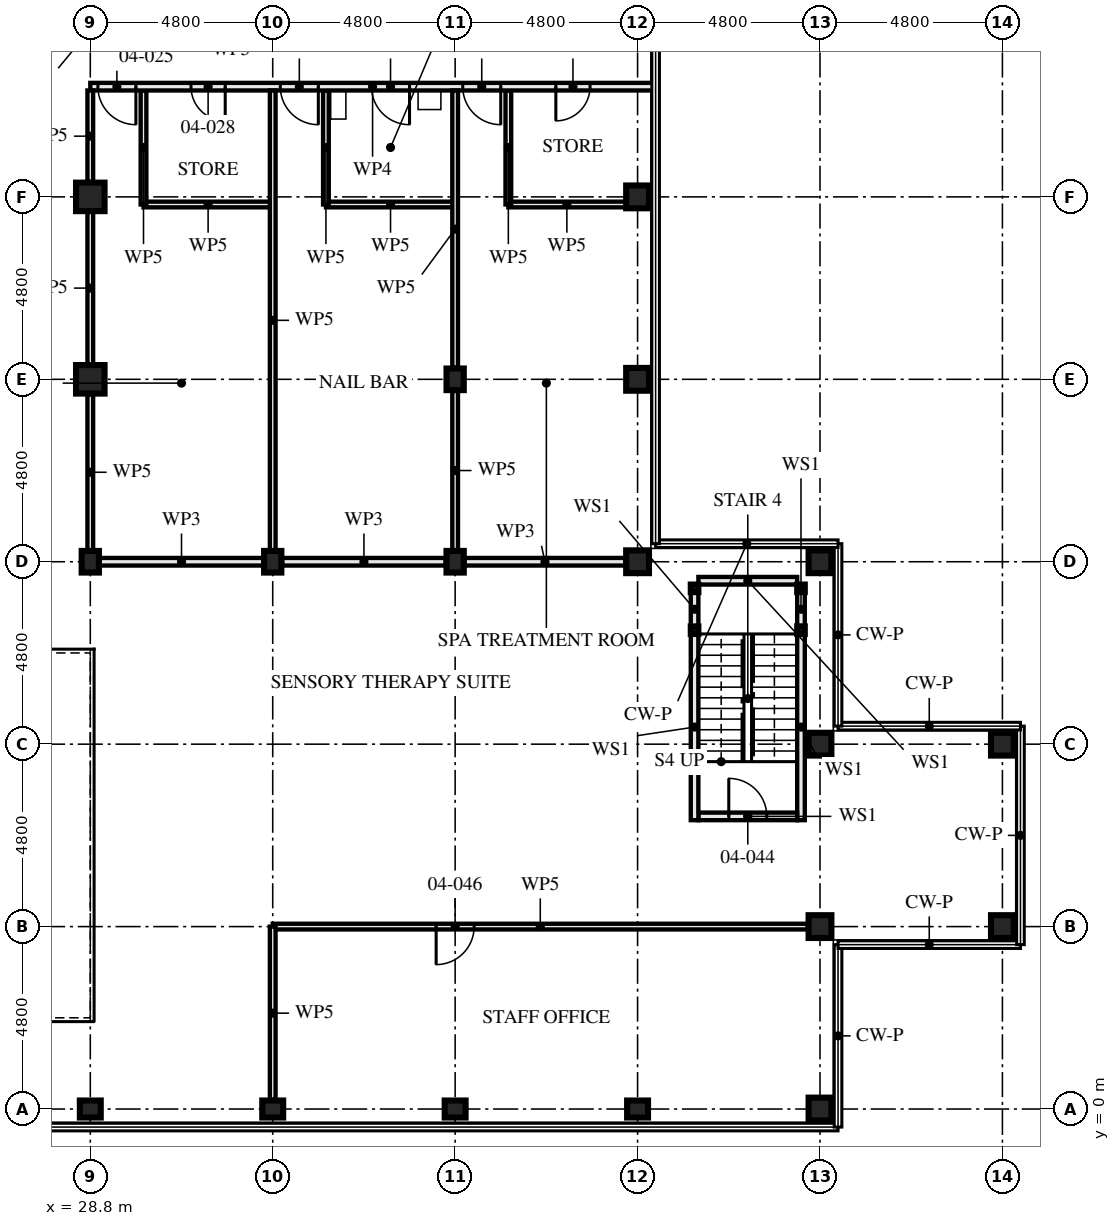
"""IFC4 building model, lengths in metres.
Left out: names, types, materials, properties, quantities, classifications, styles, units other than length and angle.
Written with IfcOpenShell. Run it as: python <this file> out.ifc"""

import sys

from ifc_helpers import new_model, si_unit, direction, frame, frame_2d, origin, origin_2d, place, context, subcontext, project, spatial, rectangle, hollow_rectangle, i_section, extrude, element, fill, save


model = new_model("IFC4")
c1 = context("Model", 3, precision=1e-05, world=origin(), true_north=direction((0.0, 1.0)))
c2 = subcontext(c1, "Body", "Model", "MODEL_VIEW")
j1 = project(units=[si_unit("LENGTHUNIT", "METRE"), si_unit("PLANEANGLEUNIT", "RADIAN")], contexts=[c1])
p1 = place(None, origin())
s1 = spatial("IfcSite", under=j1, at=p1, CompositionType="ELEMENT")
p2 = place(p1, origin())
s2 = spatial("IfcBuilding", under=s1, at=p2, CompositionType="ELEMENT")
p3 = place(p2, frame((0.0, 0.0, 18.0)))
s3 = spatial("IfcBuildingStorey", under=s2, at=p3, CompositionType="ELEMENT", Elevation=18.0)
p4 = place(p3, frame((28.8, 0.0, 0.0), z_axis=(0.0, 0.0, 1.0), x_axis=(0.0, 1.0, 0.0)))
e1 = element("IfcColumn", 1, at=p4, inside=s3, PredefinedType="COLUMN", context=c2, shape_type="SweptSolid", body=[
    extrude(i_section(OverallWidth=0.448, OverallDepth=0.55, WebThickness=0.072, FlangeThickness=0.115, FilletRadius=0.015, at=origin_2d()), origin(), (0.0, 0.0, 1.0), 4.5),
])
p5 = place(p3, frame((28.8, 14.4, 0.0), z_axis=(0.0, 0.0, 1.0), x_axis=(1.0, 0.0, 0.0)))
e2 = element("IfcColumn", 2, at=p5, inside=s3, PredefinedType="COLUMN", context=c2, shape_type="SweptSolid", body=[
    extrude(i_section(OverallWidth=0.454, OverallDepth=0.569, WebThickness=0.078, FlangeThickness=0.125, FilletRadius=0.015, at=origin_2d()), origin(), (0.0, 0.0, 1.0), 4.5),
])
for number, where, z_axis, x_axis in (
    (3, (28.8, 19.2, 0.0), (0.0, 0.0, 1.0), (1.0, 0.0, 0.0)),
    (4, (28.8, 24.0, 0.0), (0.0, 0.0, 1.0), (1.0, 0.0, 0.0)),
):
    element("IfcColumn", number, at=place(p3, frame(where, z_axis=z_axis, x_axis=x_axis)), inside=s3, PredefinedType="COLUMN", context=c2, shape_type="SweptSolid", body=[
        extrude(hollow_rectangle(XDim=0.75, YDim=0.75, WallThickness=0.08, at=origin_2d()), origin(), (0.0, 0.0, 1.0), 4.5),
    ])
p6 = place(p3, frame((33.6, 0.0, 0.0), z_axis=(0.0, 0.0, 1.0), x_axis=(0.0, 1.0, 0.0)))
e5 = element("IfcColumn", 5, at=p6, inside=s3, PredefinedType="COLUMN", context=c2, shape_type="SweptSolid", body=[
    extrude(i_section(OverallWidth=0.448, OverallDepth=0.55, WebThickness=0.072, FlangeThickness=0.115, FilletRadius=0.015, at=origin_2d()), origin(), (0.0, 0.0, 1.0), 4.5),
])
p7 = place(p3, frame((33.6, 14.4, 0.0), z_axis=(0.0, 0.0, 1.0), x_axis=(1.0, 0.0, 0.0)))
e6 = element("IfcColumn", 6, at=p7, inside=s3, PredefinedType="COLUMN", context=c2, shape_type="SweptSolid", body=[
    extrude(i_section(OverallWidth=0.454, OverallDepth=0.569, WebThickness=0.078, FlangeThickness=0.125, FilletRadius=0.015, at=origin_2d()), origin(), (0.0, 0.0, 1.0), 4.5),
])
p8 = place(p3, frame((38.4, 0.0, 0.0), z_axis=(0.0, 0.0, 1.0), x_axis=(0.0, 1.0, 0.0)))
e7 = element("IfcColumn", 7, at=p8, inside=s3, PredefinedType="COLUMN", context=c2, shape_type="SweptSolid", body=[
    extrude(i_section(OverallWidth=0.448, OverallDepth=0.55, WebThickness=0.072, FlangeThickness=0.115, FilletRadius=0.015, at=origin_2d()), origin(), (0.0, 0.0, 1.0), 4.5),
])
for number, where, z_axis, x_axis in (
    (8, (38.4, 14.4, 0.0), (0.0, 0.0, 1.0), (1.0, 0.0, 0.0)),
    (9, (38.4, 19.2, 0.0), (0.0, 0.0, 1.0), (1.0, 0.0, 0.0)),
):
    element("IfcColumn", number, at=place(p3, frame(where, z_axis=z_axis, x_axis=x_axis)), inside=s3, PredefinedType="COLUMN", context=c2, shape_type="SweptSolid", body=[
        extrude(i_section(OverallWidth=0.454, OverallDepth=0.569, WebThickness=0.078, FlangeThickness=0.125, FilletRadius=0.015, at=origin_2d()), origin(), (0.0, 0.0, 1.0), 4.5),
    ])
p9 = place(p3, frame((43.2, 0.0, 0.0), z_axis=(0.0, 0.0, 1.0), x_axis=(0.0, 1.0, 0.0)))
e10 = element("IfcColumn", 10, at=p9, inside=s3, PredefinedType="COLUMN", context=c2, shape_type="SweptSolid", body=[
    extrude(i_section(OverallWidth=0.448, OverallDepth=0.55, WebThickness=0.072, FlangeThickness=0.115, FilletRadius=0.015, at=origin_2d()), origin(), (0.0, 0.0, 1.0), 4.5),
])
p10 = place(p3, frame((43.2, 14.4, 0.0), z_axis=(0.0, 0.0, 1.0), x_axis=(0.0, 1.0, 0.0)))
e11 = element("IfcColumn", 11, at=p10, inside=s3, PredefinedType="COLUMN", context=c2, shape_type="SweptSolid", body=[
    extrude(hollow_rectangle(XDim=0.6, YDim=0.6, WallThickness=0.05, at=origin_2d()), origin(), (0.0, 0.0, 1.0), 4.5),
])
for number, where, z_axis, x_axis in (
    (12, (43.2, 19.2, 0.0), (0.0, 0.0, 1.0), (1.0, 0.0, 0.0)),
    (13, (43.2, 24.0, 0.0), (0.0, 0.0, 1.0), (1.0, 0.0, 0.0)),
):
    element("IfcColumn", number, at=place(p3, frame(where, z_axis=z_axis, x_axis=x_axis)), inside=s3, PredefinedType="COLUMN", context=c2, shape_type="SweptSolid", body=[
        extrude(hollow_rectangle(XDim=0.6, YDim=0.6, WallThickness=0.08, at=origin_2d()), origin(), (0.0, 0.0, 1.0), 4.5),
    ])
for number, where, z_axis, x_axis in (
    (14, (48.0, 0.0, 0.0), (0.0, 0.0, 1.0), (0.0, 1.0, 0.0)),
    (15, (48.0, 4.8, 0.0), (0.0, 0.0, 1.0), (0.0, 1.0, 0.0)),
    (16, (48.0, 9.6, 0.0), (0.0, 0.0, 1.0), (0.0, 1.0, 0.0)),
    (17, (48.0, 14.4, 0.0), (0.0, 0.0, 1.0), (0.0, 1.0, 0.0)),
    (18, (52.8, 4.8, 0.0), (0.0, 0.0, 1.0), (0.0, 1.0, 0.0)),
    (19, (52.8, 9.6, 0.0), (0.0, 0.0, 1.0), (0.0, 1.0, 0.0)),
):
    element("IfcColumn", number, at=place(p3, frame(where, z_axis=z_axis, x_axis=x_axis)), inside=s3, PredefinedType="COLUMN", context=c2, shape_type="SweptSolid", body=[
        extrude(hollow_rectangle(XDim=0.6, YDim=0.6, WallThickness=0.05, at=origin_2d()), origin(), (0.0, 0.0, 1.0), 4.5),
    ])
for number, where, z_axis, x_axis in (
    (20, (44.7, 13.7, 0.0), (0.0, 0.0, 1.0), (1.0, 0.0, 0.0)),
    (21, (47.5, 13.7, 0.0), (0.0, 0.0, 1.0), (1.0, 0.0, 0.0)),
    (22, (44.7, 12.6, 0.0), (0.0, 0.0, 1.0), (1.0, 0.0, 0.0)),
    (23, (47.5, 12.6, 0.0), (0.0, 0.0, 1.0), (1.0, 0.0, 0.0)),
):
    element("IfcColumn", number, at=place(p3, frame(where, z_axis=z_axis, x_axis=x_axis)), inside=s3, PredefinedType="COLUMN", context=c2, shape_type="SweptSolid", body=[
        extrude(hollow_rectangle(XDim=0.2, YDim=0.2, WallThickness=0.008, at=origin_2d()), origin(), (0.0, 0.0, 1.0), 4.33),
    ])
p11 = place(p3, frame((30.2, 23.8, 0.0), z_axis=(0.0, 0.0, 1.0), x_axis=(0.0, 1.0, 0.0)))
e24 = element("IfcWall", 24, at=p11, inside=s3, PredefinedType="PARTITIONING", context=c2, shape_type="SweptSolid", body=[
    extrude(rectangle(XDim=3.0, YDim=0.15, at=frame_2d((1.5, 0.0))), origin(), (0.0, 0.0, 1.0), 3.55),
])
p12 = place(p3, frame((30.2, 23.8, 0.0), z_axis=(0.0, 0.0, 1.0), x_axis=(1.0, 0.0, 0.0)))
e25 = element("IfcWall", 25, at=p12, inside=s3, PredefinedType="PARTITIONING", context=c2, shape_type="SweptSolid", body=[
    extrude(rectangle(XDim=3.4, YDim=0.15, at=frame_2d((1.7, 0.0))), origin(), (0.0, 0.0, 1.0), 4.33),
])
p13 = place(p3, frame((35.0, 23.8, 0.0), z_axis=(0.0, 0.0, 1.0), x_axis=(0.0, 1.0, 0.0)))
e26 = element("IfcWall", 26, at=p13, inside=s3, PredefinedType="PARTITIONING", context=c2, shape_type="SweptSolid", body=[
    extrude(rectangle(XDim=3.0, YDim=0.15, at=frame_2d((1.5, 0.0))), origin(), (0.0, 0.0, 1.0), 3.55),
])
p14 = place(p3, frame((35.0, 23.8, 0.0), z_axis=(0.0, 0.0, 1.0), x_axis=(1.0, 0.0, 0.0)))
e27 = element("IfcWall", 27, at=p14, inside=s3, PredefinedType="PARTITIONING", context=c2, shape_type="SweptSolid", body=[
    extrude(rectangle(XDim=3.4, YDim=0.15, at=frame_2d((1.7, 0.0))), origin(), (0.0, 0.0, 1.0), 4.33),
])
p15 = place(p3, frame((39.8, 23.8, 0.0), z_axis=(0.0, 0.0, 1.0), x_axis=(0.0, 1.0, 0.0)))
e28 = element("IfcWall", 28, at=p15, inside=s3, PredefinedType="PARTITIONING", context=c2, shape_type="SweptSolid", body=[
    extrude(rectangle(XDim=3.0, YDim=0.15, at=frame_2d((1.5, 0.0))), origin(), (0.0, 0.0, 1.0), 3.55),
])
p16 = place(p3, frame((39.8, 23.8, 0.0), z_axis=(0.0, 0.0, 1.0), x_axis=(1.0, 0.0, 0.0)))
e29 = element("IfcWall", 29, at=p16, inside=s3, PredefinedType="PARTITIONING", context=c2, shape_type="SweptSolid", body=[
    extrude(rectangle(XDim=3.08, YDim=0.15, at=frame_2d((1.54, 0.0))), origin(), (0.0, 0.0, 1.0), 4.33),
])
p17 = place(p3, frame((33.6, 14.705, 0.0), z_axis=(0.0, 0.0, 1.0), x_axis=(0.0, 1.0, 0.0)))
e30 = element("IfcWall", 30, at=p17, inside=s3, PredefinedType="PARTITIONING", context=c2, shape_type="SweptSolid", body=[
    extrude(rectangle(XDim=12.095, YDim=0.15, at=frame_2d((6.048, 0.0))), origin(), (0.0, 0.0, 1.0), 3.55),
])
p18 = place(p3, frame((38.4, 14.705, 0.0), z_axis=(0.0, 0.0, 1.0), x_axis=(0.0, 1.0, 0.0)))
e31 = element("IfcWall", 31, at=p18, inside=s3, PredefinedType="PARTITIONING", context=c2, shape_type="SweptSolid", body=[
    extrude(rectangle(XDim=4.191, YDim=0.15, at=frame_2d((2.095, 0.0))), origin(), (0.0, 0.0, 1.0), 3.32),
])
p19 = place(p3, frame((38.4, 19.504, 0.0), z_axis=(0.0, 0.0, 1.0), x_axis=(0.0, 1.0, 0.0)))
e32 = element("IfcWall", 32, at=p19, inside=s3, PredefinedType="PARTITIONING", context=c2, shape_type="SweptSolid", body=[
    extrude(rectangle(XDim=7.296, YDim=0.15, at=frame_2d((3.648, 0.0))), origin(), (0.0, 0.0, 1.0), 3.32),
])
p20 = place(p3, frame((28.8, 26.9, 0.0), z_axis=(0.0, 0.0, 1.0), x_axis=(1.0, 0.0, 0.0)))
e33 = element("IfcWall", 33, at=p20, inside=s3, PredefinedType="PARTITIONING", context=c2, shape_type="SweptSolid", body=[
    extrude(rectangle(XDim=14.855, YDim=0.2, at=frame_2d((7.427, 0.0))), origin(), (0.0, 0.0, 1.0), 3.32),
])
p21 = place(p20, frame((0.2, 0.0, 0.0)))
e34 = element("IfcOpeningElement", 34, at=p21, cuts=e33, PredefinedType="OPENING", context=c2, shape_type="SweptSolid", body=[
    extrude(rectangle(XDim=1.0, YDim=2.4, at=frame_2d((0.5, 1.2))), frame((0.0, 0.111, 0.0), z_axis=(0.0, -1.0, 0.0), x_axis=(1.0, 0.0, 0.0)), (0.0, 0.0, 1.0), 0.221),
])
p22 = place(p20, frame((5.0, 0.0, 0.0)))
e35 = element("IfcOpeningElement", 35, at=p22, cuts=e33, PredefinedType="OPENING", context=c2, shape_type="SweptSolid", body=[
    extrude(rectangle(XDim=1.0, YDim=2.4, at=frame_2d((0.5, 1.2))), frame((0.0, 0.111, 0.0), z_axis=(0.0, -1.0, 0.0), x_axis=(1.0, 0.0, 0.0)), (0.0, 0.0, 1.0), 0.221),
])
p23 = place(p20, frame((9.8, 0.0, 0.0)))
e36 = element("IfcOpeningElement", 36, at=p23, cuts=e33, PredefinedType="OPENING", context=c2, shape_type="SweptSolid", body=[
    extrude(rectangle(XDim=1.0, YDim=2.4, at=frame_2d((0.5, 1.2))), frame((0.0, 0.111, 0.0), z_axis=(0.0, -1.0, 0.0), x_axis=(1.0, 0.0, 0.0)), (0.0, 0.0, 1.0), 0.221),
])
p24 = place(p20, frame((2.65, 0.0, 0.0)))
e37 = element("IfcOpeningElement", 37, at=p24, cuts=e33, PredefinedType="OPENING", context=c2, shape_type="SweptSolid", body=[
    extrude(rectangle(XDim=0.9, YDim=2.1, at=frame_2d((0.45, 1.05))), frame((0.0, 0.111, 0.0), z_axis=(0.0, -1.0, 0.0), x_axis=(1.0, 0.0, 0.0)), (0.0, 0.0, 1.0), 0.221),
])
p25 = place(p20, frame((7.4, 0.0, 0.0)))
e38 = element("IfcOpeningElement", 38, at=p25, cuts=e33, PredefinedType="OPENING", context=c2, shape_type="SweptSolid", body=[
    extrude(rectangle(XDim=1.0, YDim=2.1, at=frame_2d((0.5, 1.05))), frame((0.0, 0.111, 0.0), z_axis=(0.0, -1.0, 0.0), x_axis=(1.0, 0.0, 0.0)), (0.0, 0.0, 1.0), 0.221),
])
p26 = place(p20, frame((12.25, 0.0, 0.0)))
e39 = element("IfcOpeningElement", 39, at=p26, cuts=e33, PredefinedType="OPENING", context=c2, shape_type="SweptSolid", body=[
    extrude(rectangle(XDim=0.9, YDim=2.1, at=frame_2d((0.45, 1.05))), frame((0.0, 0.111, 0.0), z_axis=(0.0, -1.0, 0.0), x_axis=(1.0, 0.0, 0.0)), (0.0, 0.0, 1.0), 0.221),
])
p27 = place(p3, frame((44.7, 13.6, 0.0), z_axis=(0.0, 0.0, 1.0), x_axis=(0.0, -1.0, 0.0)))
e40 = element("IfcWall", 40, at=p27, inside=s3, PredefinedType="SOLIDWALL", context=c2, shape_type="SweptSolid", body=[
    extrude(rectangle(XDim=0.9, YDim=0.2, at=frame_2d((0.45, 0.0))), origin(), (0.0, 0.0, 1.0), 4.02),
])
p28 = place(p3, frame((44.7, 12.5, 0.0), z_axis=(0.0, 0.0, 1.0), x_axis=(0.0, -1.0, 0.0)))
e41 = element("IfcWall", 41, at=p28, inside=s3, PredefinedType="SOLIDWALL", context=c2, shape_type="SweptSolid", body=[
    extrude(rectangle(XDim=4.9, YDim=0.2, at=frame_2d((2.45, 0.0))), origin(), (0.0, 0.0, 1.0), 4.02),
])
p29 = place(p3, frame((47.5, 13.6, 0.0), z_axis=(0.0, 0.0, 1.0), x_axis=(0.0, -1.0, 0.0)))
e42 = element("IfcWall", 42, at=p29, inside=s3, PredefinedType="SOLIDWALL", context=c2, shape_type="SweptSolid", body=[
    extrude(rectangle(XDim=0.9, YDim=0.2, at=frame_2d((0.45, 0.0))), origin(), (0.0, 0.0, 1.0), 4.02),
])
p30 = place(p3, frame((47.5, 12.5, 0.0), z_axis=(0.0, 0.0, 1.0), x_axis=(0.0, -1.0, 0.0)))
e43 = element("IfcWall", 43, at=p30, inside=s3, PredefinedType="SOLIDWALL", context=c2, shape_type="SweptSolid", body=[
    extrude(rectangle(XDim=4.9, YDim=0.2, at=frame_2d((2.45, 0.0))), origin(), (0.0, 0.0, 1.0), 4.02),
])
p31 = place(p3, frame((44.8, 13.9, 0.0), z_axis=(0.0, 0.0, 1.0), x_axis=(1.0, 0.0, 0.0)))
e44 = element("IfcWall", 44, at=p31, inside=s3, PredefinedType="SOLIDWALL", context=c2, shape_type="SweptSolid", body=[
    extrude(rectangle(XDim=2.6, YDim=0.2, at=frame_2d((1.3, 0.0))), origin(), (0.0, 0.0, 1.0), 4.33),
])
p32 = place(p3, frame((44.8, 7.7, 0.0), z_axis=(0.0, 0.0, 1.0), x_axis=(1.0, 0.0, 0.0)))
e45 = element("IfcWall", 45, at=p32, inside=s3, PredefinedType="SOLIDWALL", context=c2, shape_type="SweptSolid", body=[
    extrude(rectangle(XDim=2.6, YDim=0.2, at=frame_2d((1.3, 0.0))), origin(), (0.0, 0.0, 1.0), 4.33),
])
p33 = place(p32, frame((0.8, 0.0, 0.0)))
e46 = element("IfcOpeningElement", 46, at=p33, cuts=e45, PredefinedType="OPENING", context=c2, shape_type="SweptSolid", body=[
    extrude(rectangle(XDim=1.0, YDim=2.1, at=frame_2d((0.5, 1.05))), frame((0.0, 0.111, 0.0), z_axis=(0.0, -1.0, 0.0), x_axis=(1.0, 0.0, 0.0)), (0.0, 0.0, 1.0), 0.221),
])
p34 = place(p3, frame((33.6, 4.8, 0.0), z_axis=(0.0, 0.0, 1.0), x_axis=(1.0, 0.0, 0.0)))
e47 = element("IfcWall", 47, at=p34, inside=s3, PredefinedType="PARTITIONING", context=c2, shape_type="SweptSolid", body=[
    extrude(rectangle(XDim=14.08, YDim=0.15, at=frame_2d((7.04, 0.0))), origin(), (0.0, 0.0, 1.0), 3.55),
])
p35 = place(p34, frame((4.3, 0.0, 0.0)))
e48 = element("IfcOpeningElement", 48, at=p35, cuts=e47, PredefinedType="OPENING", context=c2, shape_type="SweptSolid", body=[
    extrude(rectangle(XDim=1.0, YDim=2.4, at=frame_2d((0.5, 1.2))), frame((0.0, 0.085, 0.0), z_axis=(0.0, -1.0, 0.0), x_axis=(1.0, 0.0, 0.0)), (0.0, 0.0, 1.0), 0.171),
])
p36 = place(p3, frame((33.6, 0.244, 0.0), z_axis=(0.0, 0.0, 1.0), x_axis=(0.0, 1.0, 0.0)))
e49 = element("IfcWall", 49, at=p36, inside=s3, PredefinedType="PARTITIONING", context=c2, shape_type="SweptSolid", body=[
    extrude(rectangle(XDim=4.556, YDim=0.15, at=frame_2d((2.278, 0.0))), origin(), (0.0, 0.0, 1.0), 3.55),
])
p37 = place(p3, frame((29.047, 14.4, 0.0), z_axis=(0.0, 0.0, 1.0), x_axis=(1.0, 0.0, 0.0)))
e50 = element("IfcWall", 50, at=p37, inside=s3, PredefinedType="PARTITIONING", context=c2, shape_type="SweptSolid", body=[
    extrude(rectangle(XDim=4.306, YDim=0.2, at=frame_2d((2.153, 0.0))), origin(), (0.0, 0.0, 1.0), 3.32),
])
p38 = place(p3, frame((33.847, 14.4, 0.0), z_axis=(0.0, 0.0, 1.0), x_axis=(1.0, 0.0, 0.0)))
e51 = element("IfcWall", 51, at=p38, inside=s3, PredefinedType="PARTITIONING", context=c2, shape_type="SweptSolid", body=[
    extrude(rectangle(XDim=4.306, YDim=0.2, at=frame_2d((2.153, 0.0))), origin(), (0.0, 0.0, 1.0), 3.32),
])
p39 = place(p3, frame((38.647, 14.4, 0.0), z_axis=(0.0, 0.0, 1.0), x_axis=(1.0, 0.0, 0.0)))
e52 = element("IfcWall", 52, at=p39, inside=s3, PredefinedType="PARTITIONING", context=c2, shape_type="SweptSolid", body=[
    extrude(rectangle(XDim=4.233, YDim=0.2, at=frame_2d((2.116, 0.0))), origin(), (0.0, 0.0, 1.0), 3.32),
])
p40 = place(p3, frame((28.8, 14.705, 0.0), z_axis=(0.0, 0.0, 1.0), x_axis=(0.0, 1.0, 0.0)))
e53 = element("IfcWall", 53, at=p40, inside=s3, PredefinedType="PARTITIONING", context=c2, shape_type="SweptSolid", body=[
    extrude(rectangle(XDim=4.1, YDim=0.15, at=frame_2d((2.05, 0.0))), origin(), (0.0, 0.0, 1.0), 3.32),
])
p41 = place(p3, frame((28.8, 19.595, 0.0), z_axis=(0.0, 0.0, 1.0), x_axis=(0.0, 1.0, 0.0)))
e54 = element("IfcWall", 54, at=p41, inside=s3, PredefinedType="PARTITIONING", context=c2, shape_type="SweptSolid", body=[
    extrude(rectangle(XDim=4.01, YDim=0.15, at=frame_2d((2.005, 0.0))), origin(), (0.0, 0.0, 1.0), 3.32),
])
p42 = place(p3, frame((28.8, 24.395, 0.0), z_axis=(0.0, 0.0, 1.0), x_axis=(0.0, 1.0, 0.0)))
e55 = element("IfcWall", 55, at=p42, inside=s3, PredefinedType="PARTITIONING", context=c2, shape_type="SweptSolid", body=[
    extrude(rectangle(XDim=2.405, YDim=0.15, at=frame_2d((1.203, 0.0))), origin(), (0.0, 0.0, 1.0), 3.32),
])
p43 = place(p21, frame((1.0, 0.0, 0.0), z_axis=(0.0, 0.0, 1.0), x_axis=(-1.0, 0.0, 0.0)))
e56 = element("IfcDoor", 56, at=p43, inside=s3, OperationType="SINGLE_SWING_RIGHT", PredefinedType="DOOR", context=c2, shape_type="SweptSolid", body=[
    extrude(rectangle(XDim=1.0, YDim=2.4, at=frame_2d((0.5, 1.2))), frame((0.0, 0.027, 0.0), z_axis=(0.0, -1.0, 0.0), x_axis=(1.0, 0.0, 0.0)), (0.0, 0.0, 1.0), 0.054),
])
fill(e34, e56)
p44 = place(p22, frame((1.0, 0.0, 0.0), z_axis=(0.0, 0.0, 1.0), x_axis=(-1.0, 0.0, 0.0)))
e57 = element("IfcDoor", 57, at=p44, inside=s3, OperationType="SINGLE_SWING_RIGHT", PredefinedType="DOOR", context=c2, shape_type="SweptSolid", body=[
    extrude(rectangle(XDim=1.0, YDim=2.4, at=frame_2d((0.5, 1.2))), frame((0.0, 0.027, 0.0), z_axis=(0.0, -1.0, 0.0), x_axis=(1.0, 0.0, 0.0)), (0.0, 0.0, 1.0), 0.054),
])
fill(e35, e57)
p45 = place(p23, frame((1.0, 0.0, 0.0), z_axis=(0.0, 0.0, 1.0), x_axis=(-1.0, 0.0, 0.0)))
e58 = element("IfcDoor", 58, at=p45, inside=s3, OperationType="SINGLE_SWING_RIGHT", PredefinedType="DOOR", context=c2, shape_type="SweptSolid", body=[
    extrude(rectangle(XDim=1.0, YDim=2.4, at=frame_2d((0.5, 1.2))), frame((0.0, 0.027, 0.0), z_axis=(0.0, -1.0, 0.0), x_axis=(1.0, 0.0, 0.0)), (0.0, 0.0, 1.0), 0.054),
])
fill(e36, e58)
p46 = place(p24, frame((0.9, 0.0, 0.0), z_axis=(0.0, 0.0, 1.0), x_axis=(-1.0, 0.0, 0.0)))
e59 = element("IfcDoor", 59, at=p46, inside=s3, OperationType="SINGLE_SWING_RIGHT", PredefinedType="DOOR", context=c2, shape_type="SweptSolid", body=[
    extrude(rectangle(XDim=0.9, YDim=2.1, at=frame_2d((0.45, 1.05))), frame((0.0, 0.027, 0.0), z_axis=(0.0, -1.0, 0.0), x_axis=(1.0, 0.0, 0.0)), (0.0, 0.0, 1.0), 0.054),
])
fill(e37, e59)
p47 = place(p25, frame((1.0, 0.0, 0.0), z_axis=(0.0, 0.0, 1.0), x_axis=(-1.0, 0.0, 0.0)))
e60 = element("IfcDoor", 60, at=p47, inside=s3, OperationType="SINGLE_SWING_RIGHT", PredefinedType="DOOR", context=c2, shape_type="SweptSolid", body=[
    extrude(rectangle(XDim=1.0, YDim=2.1, at=frame_2d((0.5, 1.05))), frame((0.0, 0.027, 0.0), z_axis=(0.0, -1.0, 0.0), x_axis=(1.0, 0.0, 0.0)), (0.0, 0.0, 1.0), 0.054),
])
fill(e38, e60)
p48 = place(p26, frame((0.9, 0.0, 0.0), z_axis=(0.0, 0.0, 1.0), x_axis=(-1.0, 0.0, 0.0)))
e61 = element("IfcDoor", 61, at=p48, inside=s3, OperationType="SINGLE_SWING_LEFT", PredefinedType="DOOR", context=c2, shape_type="SweptSolid", body=[
    extrude(rectangle(XDim=0.9, YDim=2.1, at=frame_2d((0.45, 1.05))), frame((0.0, 0.027, 0.0), z_axis=(0.0, -1.0, 0.0), x_axis=(1.0, 0.0, 0.0)), (0.0, 0.0, 1.0), 0.054),
])
fill(e39, e61)
p49 = place(p33, origin())
e62 = element("IfcDoor", 62, at=p49, inside=s3, OperationType="SINGLE_SWING_RIGHT", PredefinedType="DOOR", context=c2, shape_type="SweptSolid", body=[
    extrude(rectangle(XDim=1.0, YDim=2.1, at=frame_2d((0.5, 1.05))), frame((0.0, 0.032, 0.0), z_axis=(0.0, -1.0, 0.0), x_axis=(1.0, 0.0, 0.0)), (0.0, 0.0, 1.0), 0.064),
])
fill(e46, e62)
p50 = place(p35, frame((1.0, 0.0, 0.0), z_axis=(0.0, 0.0, 1.0), x_axis=(-1.0, 0.0, 0.0)))
e63 = element("IfcDoor", 63, at=p50, inside=s3, OperationType="SINGLE_SWING_LEFT", PredefinedType="DOOR", context=c2, shape_type="SweptSolid", body=[
    extrude(rectangle(XDim=1.0, YDim=2.4, at=frame_2d((0.5, 1.2))), frame((0.0, 0.027, 0.0), z_axis=(0.0, -1.0, 0.0), x_axis=(1.0, 0.0, 0.0)), (0.0, 0.0, 1.0), 0.054),
])
fill(e48, e63)
save(model, sys.argv[1])
